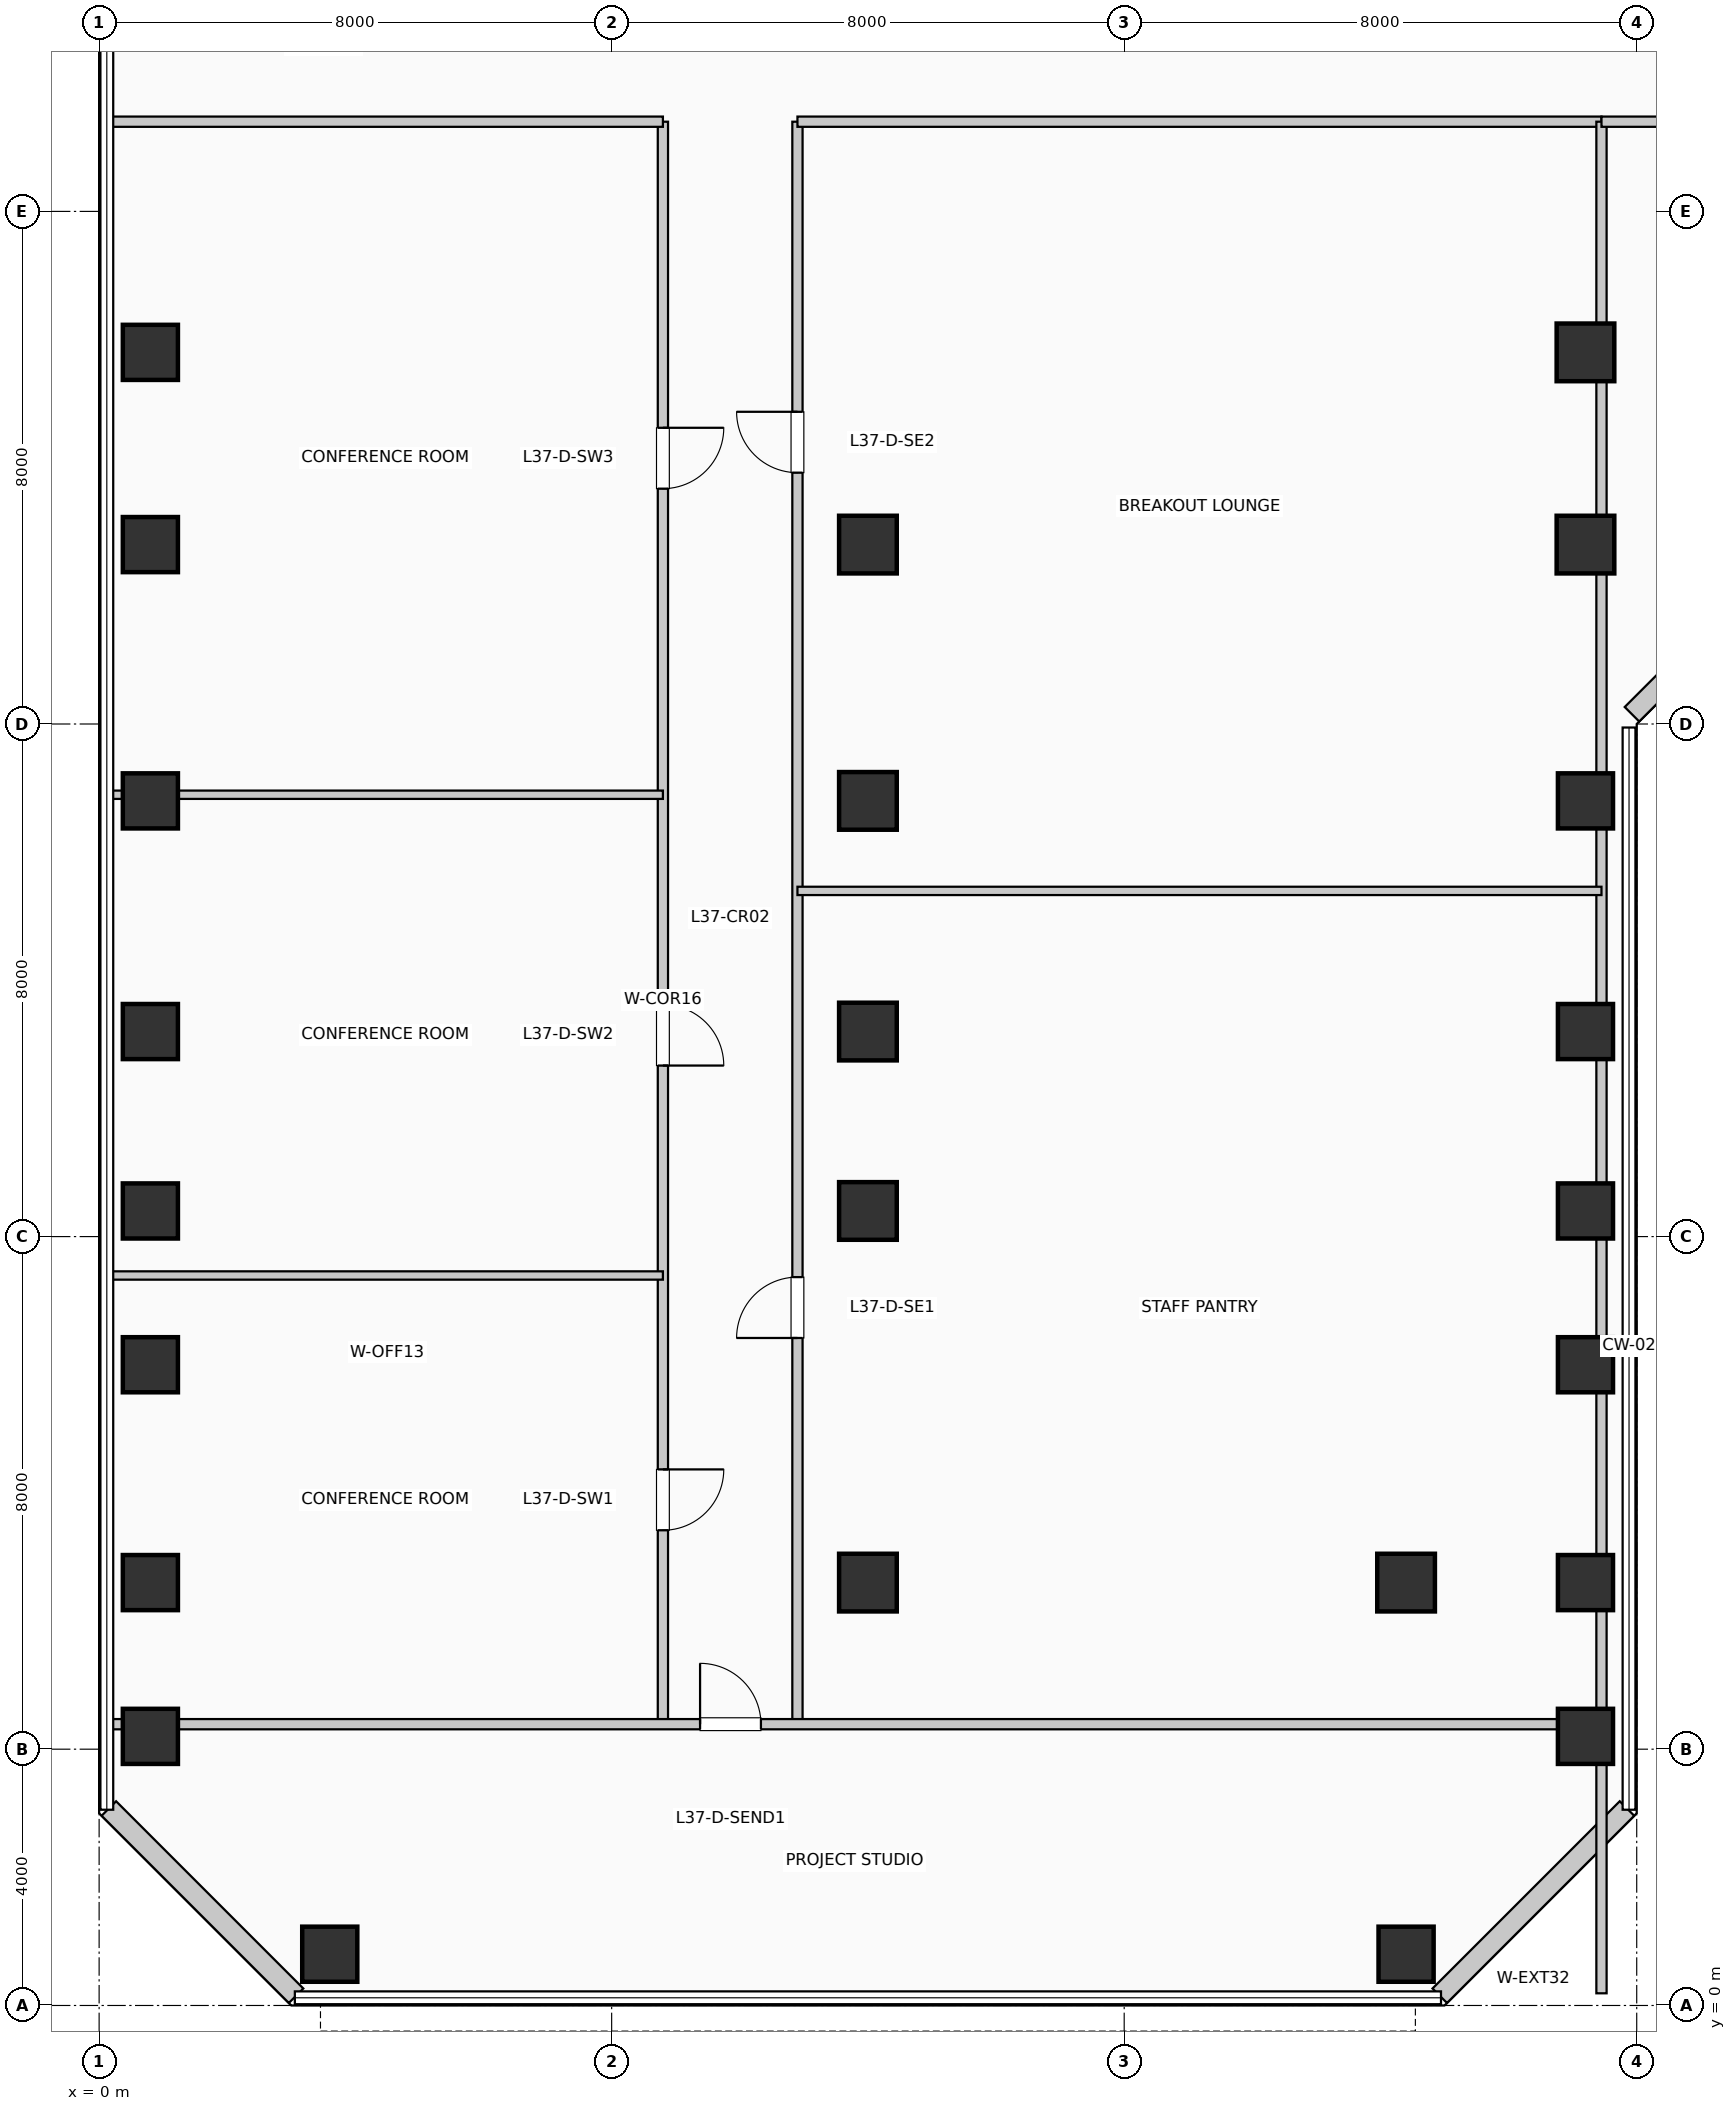
"""IFC4 building model, lengths in metres.
Left out: names, types, materials, properties, quantities, classifications, styles, units other than length and angle.
Written with IfcOpenShell. Run it as: python <this file> out.ifc"""

import sys

from ifc_helpers import new_model, si_unit, direction, frame, frame_2d, origin, origin_2d, place, context, subcontext, project, spatial, rectangle, extrude, element, fill, save


model = new_model("IFC4")
c1 = context("Model", 3, precision=1e-05, world=origin(), true_north=direction((0.0, 1.0)))
c2 = subcontext(c1, "Body", "Model", "MODEL_VIEW")
j1 = project(units=[si_unit("LENGTHUNIT", "METRE"), si_unit("PLANEANGLEUNIT", "RADIAN")], contexts=[c1])
p1 = place(None, origin())
s1 = spatial("IfcSite", under=j1, at=p1, CompositionType="ELEMENT")
p2 = place(p1, origin())
s2 = spatial("IfcBuilding", under=s1, at=p2, CompositionType="ELEMENT")
p3 = place(p2, frame((0.0, 0.0, 154.77)))
s3 = spatial("IfcBuildingStorey", under=s2, at=p3, CompositionType="ELEMENT", Elevation=154.77)
for number, where, z_axis, x_axis in (
    (1, (0.8, 4.2, 0.0), (0.0, 0.0, 1.0), (1.0, 0.0, 0.0)),
    (2, (0.8, 6.6, 0.0), (0.0, 0.0, 1.0), (1.0, 0.0, 0.0)),
    (3, (0.8, 10.0, 0.0), (0.0, 0.0, 1.0), (1.0, 0.0, 0.0)),
    (4, (0.8, 12.4, 0.0), (0.0, 0.0, 1.0), (1.0, 0.0, 0.0)),
    (5, (0.8, 15.2, 0.0), (0.0, 0.0, 1.0), (1.0, 0.0, 0.0)),
    (6, (0.8, 18.8, 0.0), (0.0, 0.0, 1.0), (1.0, 0.0, 0.0)),
    (7, (0.8, 22.8, 0.0), (0.0, 0.0, 1.0), (1.0, 0.0, 0.0)),
    (8, (0.8, 25.8, 0.0), (0.0, 0.0, 1.0), (1.0, 0.0, 0.0)),
    (9, (3.6, 0.8, 0.0), (0.0, 0.0, 1.0), (1.0, 0.0, 0.0)),
):
    element("IfcColumn", number, at=place(p3, frame(where, z_axis=z_axis, x_axis=x_axis)), inside=s3, PredefinedType="COLUMN", context=c2, shape_type="SweptSolid", body=[
        extrude(rectangle(XDim=0.86, YDim=0.86, at=origin_2d()), origin(), (0.0, 0.0, 1.0), 3.96),
    ])
for number, where, z_axis, x_axis in (
    (10, (12.0, 6.6, 0.0), (0.0, 0.0, 1.0), (1.0, 0.0, 0.0)),
    (11, (12.0, 12.4, 0.0), (0.0, 0.0, 1.0), (1.0, 0.0, 0.0)),
    (12, (12.0, 15.2, 0.0), (0.0, 0.0, 1.0), (1.0, 0.0, 0.0)),
    (13, (12.0, 18.8, 0.0), (0.0, 0.0, 1.0), (1.0, 0.0, 0.0)),
    (14, (12.0, 22.8, 0.0), (0.0, 0.0, 1.0), (1.0, 0.0, 0.0)),
):
    element("IfcColumn", number, at=place(p3, frame(where, z_axis=z_axis, x_axis=x_axis)), inside=s3, PredefinedType="COLUMN", context=c2, shape_type="SweptSolid", body=[
        extrude(rectangle(XDim=0.9, YDim=0.9, at=origin_2d()), origin(), (0.0, 0.0, 1.0), 3.96),
    ])
p4 = place(p3, frame((20.4, 0.8, 0.0), z_axis=(0.0, 0.0, 1.0), x_axis=(1.0, 0.0, 0.0)))
e15 = element("IfcColumn", 15, at=p4, inside=s3, PredefinedType="COLUMN", context=c2, shape_type="SweptSolid", body=[
    extrude(rectangle(XDim=0.86, YDim=0.86, at=origin_2d()), origin(), (0.0, 0.0, 1.0), 3.96),
])
p5 = place(p3, frame((20.4, 6.6, 0.0), z_axis=(0.0, 0.0, 1.0), x_axis=(1.0, 0.0, 0.0)))
e16 = element("IfcColumn", 16, at=p5, inside=s3, PredefinedType="COLUMN", context=c2, shape_type="SweptSolid", body=[
    extrude(rectangle(XDim=0.9, YDim=0.9, at=origin_2d()), origin(), (0.0, 0.0, 1.0), 3.96),
])
for number, where, z_axis, x_axis in (
    (17, (23.2, 4.2, 0.0), (0.0, 0.0, 1.0), (1.0, 0.0, 0.0)),
    (18, (23.2, 6.6, 0.0), (0.0, 0.0, 1.0), (1.0, 0.0, 0.0)),
    (19, (23.2, 10.0, 0.0), (0.0, 0.0, 1.0), (1.0, 0.0, 0.0)),
    (20, (23.2, 12.4, 0.0), (0.0, 0.0, 1.0), (1.0, 0.0, 0.0)),
    (21, (23.2, 15.2, 0.0), (0.0, 0.0, 1.0), (1.0, 0.0, 0.0)),
    (22, (23.2, 18.8, 0.0), (0.0, 0.0, 1.0), (1.0, 0.0, 0.0)),
):
    element("IfcColumn", number, at=place(p3, frame(where, z_axis=z_axis, x_axis=x_axis)), inside=s3, PredefinedType="COLUMN", context=c2, shape_type="SweptSolid", body=[
        extrude(rectangle(XDim=0.86, YDim=0.86, at=origin_2d()), origin(), (0.0, 0.0, 1.0), 3.96),
    ])
for number, where, z_axis, x_axis in (
    (23, (23.2, 22.8, 0.0), (0.0, 0.0, 1.0), (1.0, 0.0, 0.0)),
    (24, (23.2, 25.8, 0.0), (0.0, 0.0, 1.0), (1.0, 0.0, 0.0)),
):
    element("IfcColumn", number, at=place(p3, frame(where, z_axis=z_axis, x_axis=x_axis)), inside=s3, PredefinedType="COLUMN", context=c2, shape_type="SweptSolid", body=[
        extrude(rectangle(XDim=0.9, YDim=0.9, at=origin_2d()), origin(), (0.0, 0.0, 1.0), 3.96),
    ])
p6 = place(p3, frame((20.926, 0.152, 0.0), z_axis=(0.0, 0.0, 1.0), x_axis=(0.707106781187, 0.707106781187, 0.0)))
e25 = element("IfcWall", 25, at=p6, inside=s3, PredefinedType="SOLIDWALL", context=c2, shape_type="SweptSolid", body=[
    extrude(rectangle(XDim=4.133, YDim=0.32, at=frame_2d((2.066, 0.0))), origin(), (0.0, 0.0, 1.0), 3.71),
])
p7 = place(p3, frame((23.926, 20.152, 0.0), z_axis=(0.0, 0.0, 1.0), x_axis=(0.707106781187, 0.707106781187, 0.0)))
e26 = element("IfcWall", 26, at=p7, inside=s3, PredefinedType="SOLIDWALL", context=c2, shape_type="SweptSolid", body=[
    extrude(rectangle(XDim=2.718, YDim=0.32, at=frame_2d((1.359, 0.0))), origin(), (0.0, 0.0, 1.0), 3.71),
])
p8 = place(p3, frame((0.152, 3.074, 0.0), z_axis=(0.0, 0.0, 1.0), x_axis=(0.707106781187, -0.707106781187, 0.0)))
e27 = element("IfcWall", 27, at=p8, inside=s3, PredefinedType="SOLIDWALL", context=c2, shape_type="SweptSolid", body=[
    extrude(rectangle(XDim=4.133, YDim=0.32, at=frame_2d((2.066, 0.0))), origin(), (0.0, 0.0, 1.0), 3.71),
])
p9 = place(p3, frame((8.8, 4.39, 0.0), z_axis=(0.0, 0.0, 1.0), x_axis=(0.0, 1.0, 0.0)))
e28 = element("IfcWall", 28, at=p9, inside=s3, PredefinedType="PARTITIONING", context=c2, shape_type="SweptSolid", body=[
    extrude(rectangle(XDim=25.01, YDim=0.16, at=frame_2d((12.505, 0.0))), origin(), (0.0, 0.0, 1.0), 3.71),
])
p10 = place(p9, frame((3.976, 0.0, 0.0), z_axis=(0.0, 0.0, 1.0), x_axis=(-1.0, 0.0, 0.0)))
e29 = element("IfcOpeningElement", 29, at=p10, cuts=e28, PredefinedType="OPENING", context=c2, shape_type="SweptSolid", body=[
    extrude(rectangle(XDim=0.95, YDim=2.15, at=frame_2d((0.475, 1.075))), frame((0.0, 0.09, 0.0), z_axis=(0.0, -1.0, 0.0), x_axis=(1.0, 0.0, 0.0)), (0.0, 0.0, 1.0), 0.18),
])
p11 = place(p9, frame((11.229, 0.0, 0.0), z_axis=(0.0, 0.0, 1.0), x_axis=(-1.0, 0.0, 0.0)))
e30 = element("IfcOpeningElement", 30, at=p11, cuts=e28, PredefinedType="OPENING", context=c2, shape_type="SweptSolid", body=[
    extrude(rectangle(XDim=0.95, YDim=2.15, at=frame_2d((0.475, 1.075))), frame((0.0, 0.09, 0.0), z_axis=(0.0, -1.0, 0.0), x_axis=(1.0, 0.0, 0.0)), (0.0, 0.0, 1.0), 0.18),
])
p12 = place(p9, frame((20.233, 0.0, 0.0), z_axis=(0.0, 0.0, 1.0), x_axis=(-1.0, 0.0, 0.0)))
e31 = element("IfcOpeningElement", 31, at=p12, cuts=e28, PredefinedType="OPENING", context=c2, shape_type="SweptSolid", body=[
    extrude(rectangle(XDim=0.95, YDim=2.15, at=frame_2d((0.475, 1.075))), frame((0.0, 0.09, 0.0), z_axis=(0.0, -1.0, 0.0), x_axis=(1.0, 0.0, 0.0)), (0.0, 0.0, 1.0), 0.18),
])
p13 = place(p3, frame((10.9, 4.39, 0.0), z_axis=(0.0, 0.0, 1.0), x_axis=(0.0, 1.0, 0.0)))
e32 = element("IfcWall", 32, at=p13, inside=s3, PredefinedType="PARTITIONING", context=c2, shape_type="SweptSolid", body=[
    extrude(rectangle(XDim=25.01, YDim=0.16, at=frame_2d((12.505, 0.0))), origin(), (0.0, 0.0, 1.0), 3.71),
])
p14 = place(p13, frame((6.028, 0.0, 0.0)))
e33 = element("IfcOpeningElement", 33, at=p14, cuts=e32, PredefinedType="OPENING", context=c2, shape_type="SweptSolid", body=[
    extrude(rectangle(XDim=0.95, YDim=2.15, at=frame_2d((0.475, 1.075))), frame((0.0, 0.09, 0.0), z_axis=(0.0, -1.0, 0.0), x_axis=(1.0, 0.0, 0.0)), (0.0, 0.0, 1.0), 0.18),
])
p15 = place(p13, frame((19.533, 0.0, 0.0)))
e34 = element("IfcOpeningElement", 34, at=p15, cuts=e32, PredefinedType="OPENING", context=c2, shape_type="SweptSolid", body=[
    extrude(rectangle(XDim=0.95, YDim=2.15, at=frame_2d((0.475, 1.075))), frame((0.0, 0.09, 0.0), z_axis=(0.0, -1.0, 0.0), x_axis=(1.0, 0.0, 0.0)), (0.0, 0.0, 1.0), 0.18),
])
p16 = place(p3, frame((0.19, 4.39, 0.0), z_axis=(0.0, 0.0, 1.0), x_axis=(1.0, 0.0, 0.0)))
e35 = element("IfcWall", 35, at=p16, inside=s3, PredefinedType="PARTITIONING", context=c2, shape_type="SweptSolid", body=[
    extrude(rectangle(XDim=23.26, YDim=0.16, at=frame_2d((11.63, 0.0))), origin(), (0.0, 0.0, 1.0), 3.045),
])
p17 = place(p16, frame((9.19, 0.0, 0.0)))
e36 = element("IfcOpeningElement", 36, at=p17, cuts=e35, PredefinedType="OPENING", context=c2, shape_type="SweptSolid", body=[
    extrude(rectangle(XDim=0.95, YDim=2.15, at=frame_2d((0.475, 1.075))), frame((0.0, 0.09, 0.0), z_axis=(0.0, -1.0, 0.0), x_axis=(1.0, 0.0, 0.0)), (0.0, 0.0, 1.0), 0.18),
])
p18 = place(p3, frame((0.19, 29.4, 0.0), z_axis=(0.0, 0.0, 1.0), x_axis=(1.0, 0.0, 0.0)))
e37 = element("IfcWall", 37, at=p18, inside=s3, PredefinedType="PARTITIONING", context=c2, shape_type="SweptSolid", body=[
    extrude(rectangle(XDim=8.61, YDim=0.16, at=frame_2d((4.305, 0.0))), origin(), (0.0, 0.0, 1.0), 3.365),
])
p19 = place(p3, frame((10.9, 29.4, 0.0), z_axis=(0.0, 0.0, 1.0), x_axis=(1.0, 0.0, 0.0)))
e38 = element("IfcWall", 38, at=p19, inside=s3, PredefinedType="PARTITIONING", context=c2, shape_type="SweptSolid", body=[
    extrude(rectangle(XDim=12.55, YDim=0.16, at=frame_2d((6.275, 0.0))), origin(), (0.0, 0.0, 1.0), 3.365),
])
p20 = place(p3, frame((23.45, 0.19, 0.0), z_axis=(0.0, 0.0, 1.0), x_axis=(0.0, 1.0, 0.0)))
e39 = element("IfcWall", 39, at=p20, inside=s3, PredefinedType="PARTITIONING", context=c2, shape_type="SweptSolid", body=[
    extrude(rectangle(XDim=29.21, YDim=0.16, at=frame_2d((14.605, 0.0))), origin(), (0.0, 0.0, 1.0), 3.045),
])
p21 = place(p3, frame((0.19, 11.393, 0.0), z_axis=(0.0, 0.0, 1.0), x_axis=(1.0, 0.0, 0.0)))
e40 = element("IfcWall", 40, at=p21, inside=s3, PredefinedType="PARTITIONING", context=c2, shape_type="SweptSolid", body=[
    extrude(rectangle(XDim=8.61, YDim=0.13, at=frame_2d((4.305, 0.0))), origin(), (0.0, 0.0, 1.0), 3.71),
])
p22 = place(p3, frame((0.19, 18.896, 0.0), z_axis=(0.0, 0.0, 1.0), x_axis=(1.0, 0.0, 0.0)))
e41 = element("IfcWall", 41, at=p22, inside=s3, PredefinedType="PARTITIONING", context=c2, shape_type="SweptSolid", body=[
    extrude(rectangle(XDim=8.61, YDim=0.13, at=frame_2d((4.305, 0.0))), origin(), (0.0, 0.0, 1.0), 3.045),
])
p23 = place(p3, frame((10.9, 17.395, 0.0), z_axis=(0.0, 0.0, 1.0), x_axis=(1.0, 0.0, 0.0)))
e42 = element("IfcWall", 42, at=p23, inside=s3, PredefinedType="PARTITIONING", context=c2, shape_type="SweptSolid", body=[
    extrude(rectangle(XDim=12.55, YDim=0.13, at=frame_2d((6.275, 0.0))), origin(), (0.0, 0.0, 1.0), 3.71),
])
p24 = place(p3, frame((23.45, 29.4, 0.0), z_axis=(0.0, 0.0, 1.0), x_axis=(1.0, 0.0, 0.0)))
e43 = element("IfcWall", 43, at=p24, inside=s3, PredefinedType="PARTITIONING", context=c2, shape_type="SweptSolid", body=[
    extrude(rectangle(XDim=26.56, YDim=0.16, at=frame_2d((13.28, 0.0))), origin(), (0.0, 0.0, 1.0), 3.365),
])
p25 = place(p24, frame((3.396, 0.0, 0.0), z_axis=(0.0, 0.0, 1.0), x_axis=(-1.0, 0.0, 0.0)))
e44 = element("IfcOpeningElement", 44, at=p25, cuts=e43, PredefinedType="OPENING", context=c2, shape_type="SweptSolid", body=[
    extrude(rectangle(XDim=0.95, YDim=2.15, at=frame_2d((0.475, 1.075))), frame((0.0, 0.09, 0.0), z_axis=(0.0, -1.0, 0.0), x_axis=(1.0, 0.0, 0.0)), (0.0, 0.0, 1.0), 0.18),
])
p26 = place(p24, frame((9.771, 0.0, 0.0), z_axis=(0.0, 0.0, 1.0), x_axis=(-1.0, 0.0, 0.0)))
e45 = element("IfcOpeningElement", 45, at=p26, cuts=e43, PredefinedType="OPENING", context=c2, shape_type="SweptSolid", body=[
    extrude(rectangle(XDim=0.95, YDim=2.15, at=frame_2d((0.475, 1.075))), frame((0.0, 0.09, 0.0), z_axis=(0.0, -1.0, 0.0), x_axis=(1.0, 0.0, 0.0)), (0.0, 0.0, 1.0), 0.18),
])
p27 = place(p24, frame((16.942, 0.0, 0.0), z_axis=(0.0, 0.0, 1.0), x_axis=(-1.0, 0.0, 0.0)))
e46 = element("IfcOpeningElement", 46, at=p27, cuts=e43, PredefinedType="OPENING", context=c2, shape_type="SweptSolid", body=[
    extrude(rectangle(XDim=0.95, YDim=2.15, at=frame_2d((0.475, 1.075))), frame((0.0, 0.09, 0.0), z_axis=(0.0, -1.0, 0.0), x_axis=(1.0, 0.0, 0.0)), (0.0, 0.0, 1.0), 0.18),
])
p28 = place(p24, frame((23.848, 0.0, 0.0), z_axis=(0.0, 0.0, 1.0), x_axis=(-1.0, 0.0, 0.0)))
e47 = element("IfcOpeningElement", 47, at=p28, cuts=e43, PredefinedType="OPENING", context=c2, shape_type="SweptSolid", body=[
    extrude(rectangle(XDim=0.95, YDim=2.15, at=frame_2d((0.475, 1.075))), frame((0.0, 0.09, 0.0), z_axis=(0.0, -1.0, 0.0), x_axis=(1.0, 0.0, 0.0)), (0.0, 0.0, 1.0), 0.18),
])
p29 = place(p17, origin())
e48 = element("IfcDoor", 48, at=p29, inside=s3, OperationType="SINGLE_SWING_LEFT", PredefinedType="DOOR", context=c2, shape_type="SweptSolid", body=[
    extrude(rectangle(XDim=0.95, YDim=2.15, at=frame_2d((0.475, 1.075))), frame((0.0, 0.025, 0.0), z_axis=(0.0, -1.0, 0.0), x_axis=(1.0, 0.0, 0.0)), (0.0, 0.0, 1.0), 0.05),
])
fill(e36, e48)
p30 = place(p10, origin())
e49 = element("IfcDoor", 49, at=p30, inside=s3, OperationType="SINGLE_SWING_RIGHT", PredefinedType="DOOR", context=c2, shape_type="SweptSolid", body=[
    extrude(rectangle(XDim=0.95, YDim=2.15, at=frame_2d((0.475, 1.075))), frame((0.0, 0.025, 0.0), z_axis=(0.0, -1.0, 0.0), x_axis=(1.0, 0.0, 0.0)), (0.0, 0.0, 1.0), 0.05),
])
fill(e29, e49)
p31 = place(p11, origin())
e50 = element("IfcDoor", 50, at=p31, inside=s3, OperationType="SINGLE_SWING_LEFT", PredefinedType="DOOR", context=c2, shape_type="SweptSolid", body=[
    extrude(rectangle(XDim=0.95, YDim=2.15, at=frame_2d((0.475, 1.075))), frame((0.0, 0.025, 0.0), z_axis=(0.0, -1.0, 0.0), x_axis=(1.0, 0.0, 0.0)), (0.0, 0.0, 1.0), 0.05),
])
fill(e30, e50)
p32 = place(p12, origin())
e51 = element("IfcDoor", 51, at=p32, inside=s3, OperationType="SINGLE_SWING_RIGHT", PredefinedType="DOOR", context=c2, shape_type="SweptSolid", body=[
    extrude(rectangle(XDim=0.95, YDim=2.15, at=frame_2d((0.475, 1.075))), frame((0.0, 0.025, 0.0), z_axis=(0.0, -1.0, 0.0), x_axis=(1.0, 0.0, 0.0)), (0.0, 0.0, 1.0), 0.05),
])
fill(e31, e51)
p33 = place(p14, origin())
e52 = element("IfcDoor", 52, at=p33, inside=s3, OperationType="SINGLE_SWING_LEFT", PredefinedType="DOOR", context=c2, shape_type="SweptSolid", body=[
    extrude(rectangle(XDim=0.95, YDim=2.15, at=frame_2d((0.475, 1.075))), frame((0.0, 0.025, 0.0), z_axis=(0.0, -1.0, 0.0), x_axis=(1.0, 0.0, 0.0)), (0.0, 0.0, 1.0), 0.05),
])
fill(e33, e52)
p34 = place(p15, origin())
e53 = element("IfcDoor", 53, at=p34, inside=s3, OperationType="SINGLE_SWING_RIGHT", PredefinedType="DOOR", context=c2, shape_type="SweptSolid", body=[
    extrude(rectangle(XDim=0.95, YDim=2.15, at=frame_2d((0.475, 1.075))), frame((0.0, 0.025, 0.0), z_axis=(0.0, -1.0, 0.0), x_axis=(1.0, 0.0, 0.0)), (0.0, 0.0, 1.0), 0.05),
])
fill(e34, e53)
save(model, sys.argv[1])
